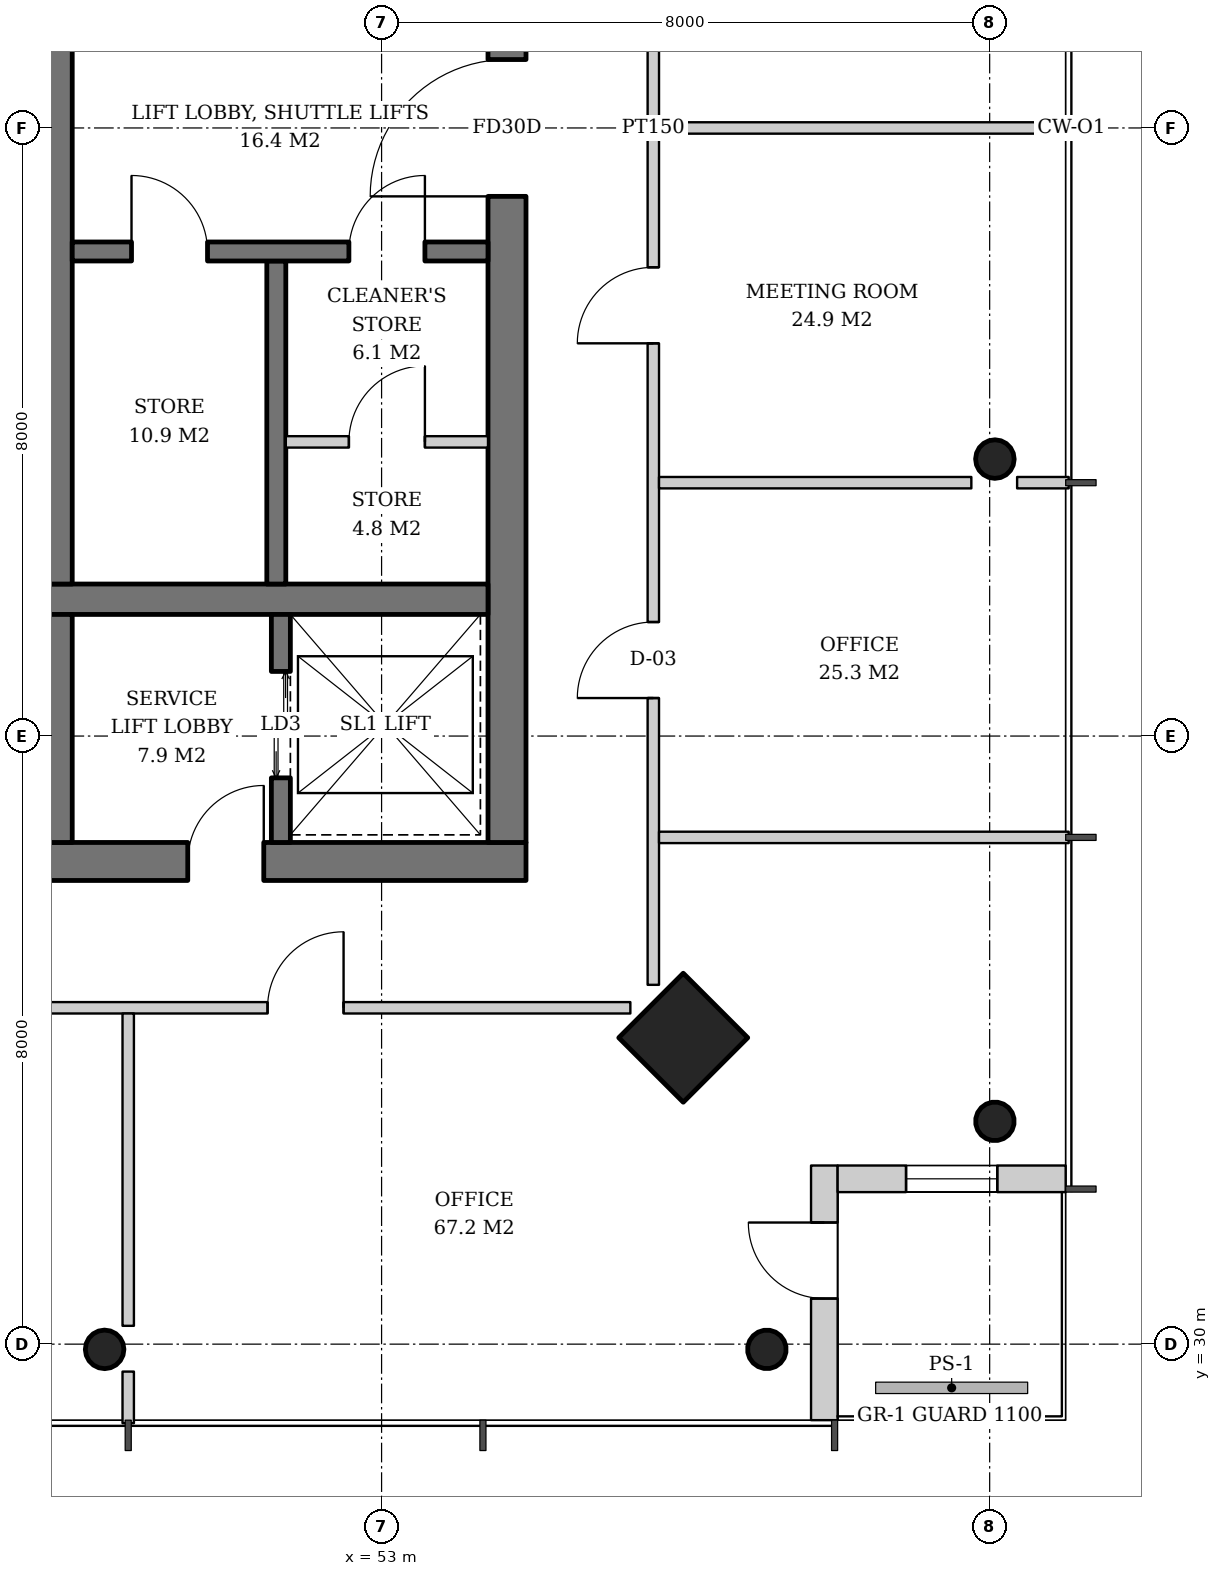
"""IFC4 building model, lengths in metres.
Left out: names, types, materials, properties, quantities, classifications, styles, units other than length and angle.
Written with IfcOpenShell. Run it as: python <this file> out.ifc"""

import sys

from ifc_helpers import new_model, si_unit, direction, frame, frame_2d, origin, origin_2d, place, context, subcontext, project, spatial, rectangle, hollow_circle, extrude, element, fill, save


model = new_model("IFC4")
c1 = context("Model", 3, precision=1e-05, world=origin(), true_north=direction((0.0, 1.0)))
c2 = subcontext(c1, "Body", "Model", "MODEL_VIEW")
j1 = project(units=[si_unit("LENGTHUNIT", "METRE"), si_unit("PLANEANGLEUNIT", "RADIAN")], contexts=[c1])
p1 = place(None, origin())
s1 = spatial("IfcSite", under=j1, at=p1, CompositionType="ELEMENT")
p2 = place(p1, origin())
s2 = spatial("IfcBuilding", under=s1, at=p2, CompositionType="ELEMENT")
p3 = place(p2, frame((0.0, 0.0, 268.0)))
s3 = spatial("IfcBuildingStorey", under=s2, at=p3, CompositionType="ELEMENT", Elevation=268.0)
p4 = place(p3, frame((61.107, 32.893, 0.0), z_axis=(-0.031962158256, 0.031962158256, 0.998977898093), x_axis=(-0.707106781187, -0.707106781187, 0.0)))
e1 = element("IfcColumn", 1, at=p4, inside=s3, PredefinedType="COLUMN", context=c2, shape_type="SweptSolid", body=[
    extrude(hollow_circle(Radius=0.254, WallThickness=0.02, at=origin_2d()), origin(), (0.0, 0.0, 1.0), 3.804),
])
p5 = place(p3, frame((61.107, 41.631, 0.0), z_axis=(-0.031976680097, 0.010658893366, 0.999431778523), x_axis=(-0.316227766017, -0.948683298051, 0.0)))
e2 = element("IfcColumn", 2, at=p5, inside=s3, PredefinedType="COLUMN", context=c2, shape_type="SweptSolid", body=[
    extrude(hollow_circle(Radius=0.254, WallThickness=0.02, at=origin_2d()), origin(), (0.0, 0.0, 1.0), 3.802),
])
p6 = place(p3, frame((57.007, 33.993, 0.0), z_axis=(-0.031898107953, 0.031898107953, 0.998981992539), x_axis=(-0.707106781187, -0.707106781187, 0.0)))
e3 = element("IfcColumn", 3, at=p6, inside=s3, PredefinedType="COLUMN", context=c2, shape_type="SweptSolid", body=[
    extrude(rectangle(XDim=1.2, YDim=1.2, at=origin_2d()), origin(), (0.0, 0.0, 1.0), 3.804),
])
p7 = place(p3, frame((58.107, 29.893, 0.0), z_axis=(-0.031962158256, 0.031962158256, 0.998977898093), x_axis=(-0.707106781187, -0.707106781187, 0.0)))
e4 = element("IfcColumn", 4, at=p7, inside=s3, PredefinedType="COLUMN", context=c2, shape_type="SweptSolid", body=[
    extrude(hollow_circle(Radius=0.254, WallThickness=0.02, at=origin_2d()), origin(), (0.0, 0.0, 1.0), 3.804),
])
p8 = place(p3, frame((49.369, 29.893, 0.0), z_axis=(-0.010658893366, 0.031976680097, 0.999431778523), x_axis=(-0.948683298051, -0.316227766017, 0.0)))
e5 = element("IfcColumn", 5, at=p8, inside=s3, PredefinedType="COLUMN", context=c2, shape_type="SweptSolid", body=[
    extrude(hollow_circle(Radius=0.254, WallThickness=0.02, at=origin_2d()), origin(), (0.0, 0.0, 1.0), 3.802),
])
p9 = place(p3, frame((35.1, 36.35, 0.0), z_axis=(0.0, 0.0, 1.0), x_axis=(1.0, 0.0, 0.0)))
e6 = element("IfcWall", 6, at=p9, inside=s3, PredefinedType="SHEAR", context=c2, shape_type="SweptSolid", body=[
    extrude(rectangle(XDim=19.8, YDim=0.5, at=frame_2d((9.9, 0.0))), origin(), (0.0, 0.0, 1.0), 3.8),
])
p10 = place(p9, frame((3.9, 0.0, 0.0)))
e7 = element("IfcOpeningElement", 7, at=p10, cuts=e6, PredefinedType="OPENING", context=c2, shape_type="SweptSolid", body=[
    extrude(rectangle(XDim=1.0, YDim=2.1, at=frame_2d((0.5, 1.05))), frame((0.0, 0.26, 0.0), z_axis=(0.0, -1.0, 0.0), x_axis=(1.0, 0.0, 0.0)), (0.0, 0.0, 1.0), 0.52),
])
p11 = place(p9, frame((15.35, 0.0, 0.0)))
e8 = element("IfcOpeningElement", 8, at=p11, cuts=e6, PredefinedType="OPENING", context=c2, shape_type="SweptSolid", body=[
    extrude(rectangle(XDim=1.0, YDim=2.1, at=frame_2d((0.5, 1.05))), frame((0.0, 0.26, 0.0), z_axis=(0.0, -1.0, 0.0), x_axis=(1.0, 0.0, 0.0)), (0.0, 0.0, 1.0), 0.52),
])
p12 = place(p3, frame((54.65, 36.6, 0.0), z_axis=(0.0, 0.0, 1.0), x_axis=(0.0, 1.0, 0.0)))
e9 = element("IfcWall", 9, at=p12, inside=s3, PredefinedType="SHEAR", context=c2, shape_type="SweptSolid", body=[
    extrude(rectangle(XDim=18.8, YDim=0.5, at=frame_2d((9.4, 0.0))), origin(), (0.0, 0.0, 1.0), 3.8),
])
p13 = place(p12, frame((8.5, 0.0, 0.0)))
e10 = element("IfcOpeningElement", 10, at=p13, cuts=e9, PredefinedType="OPENING", context=c2, shape_type="SweptSolid", body=[
    extrude(rectangle(XDim=1.8, YDim=2.4, at=frame_2d((0.9, 1.2))), frame((0.0, 0.26, 0.0), z_axis=(0.0, -1.0, 0.0), x_axis=(1.0, 0.0, 0.0)), (0.0, 0.0, 1.0), 0.52),
])
p14 = place(p3, frame((35.6, 39.8, 0.0), z_axis=(0.0, 0.0, 1.0), x_axis=(1.0, 0.0, 0.0)))
e11 = element("IfcWall", 11, at=p14, inside=s3, PredefinedType="SHEAR", context=c2, shape_type="SweptSolid", body=[
    extrude(rectangle(XDim=18.8, YDim=0.4, at=frame_2d((9.4, 0.0))), origin(), (0.0, 0.0, 1.0), 3.8),
])
p15 = place(p3, frame((48.73, 36.6, 0.0), z_axis=(0.0, 0.0, 1.0), x_axis=(0.0, 1.0, 0.0)))
e12 = element("IfcWall", 12, at=p15, inside=s3, PredefinedType="SHEAR", context=c2, shape_type="SweptSolid", body=[
    extrude(rectangle(XDim=3.0, YDim=0.4, at=frame_2d((1.5, 0.0))), origin(), (0.0, 0.0, 1.0), 3.8),
])
p16 = place(p3, frame((48.73, 40.0, 0.0), z_axis=(0.0, 0.0, 1.0), x_axis=(0.0, 1.0, 0.0)))
e13 = element("IfcWall", 13, at=p16, inside=s3, PredefinedType="SHEAR", context=c2, shape_type="SweptSolid", body=[
    extrude(rectangle(XDim=12.0, YDim=0.4, at=frame_2d((6.0, 0.0))), origin(), (0.0, 0.0, 1.0), 3.8),
])
p17 = place(p3, frame((58.825, 29.0, 0.0), z_axis=(0.0, 0.0, 1.0), x_axis=(0.0, 1.0, 0.0)))
e14 = element("IfcWall", 14, at=p17, inside=s3, PredefinedType="SOLIDWALL", context=c2, shape_type="SweptSolid", body=[
    extrude(rectangle(XDim=3.35, YDim=0.35, at=frame_2d((1.675, 0.0))), origin(), (0.0, 0.0, 1.0), 3.62),
])
p18 = place(p17, frame((1.6, 0.0, 0.0)))
e15 = element("IfcOpeningElement", 15, at=p18, cuts=e14, PredefinedType="OPENING", context=c2, shape_type="SweptSolid", body=[
    extrude(rectangle(XDim=1.0, YDim=2.4, at=frame_2d((0.5, 1.2))), frame((0.0, 0.185, 0.0), z_axis=(0.0, -1.0, 0.0), x_axis=(1.0, 0.0, 0.0)), (0.0, 0.0, 1.0), 0.37),
])
p19 = place(p3, frame((59.0, 32.175, 0.0), z_axis=(0.0, 0.0, 1.0), x_axis=(1.0, 0.0, 0.0)))
e16 = element("IfcWall", 16, at=p19, inside=s3, PredefinedType="SOLIDWALL", context=c2, shape_type="SweptSolid", body=[
    extrude(rectangle(XDim=3.0, YDim=0.35, at=frame_2d((1.5, 0.0))), origin(), (0.0, 0.0, 1.0), 3.62),
])
p20 = place(p19, frame((0.9, 0.0, 0.6)))
e17 = element("IfcOpeningElement", 17, at=p20, cuts=e16, PredefinedType="OPENING", context=c2, shape_type="SweptSolid", body=[
    extrude(rectangle(XDim=1.2, YDim=2.55, at=frame_2d((0.6, 1.275))), frame((0.0, 0.185, 0.0), z_axis=(0.0, -1.0, 0.0), x_axis=(1.0, 0.0, 0.0)), (0.0, 0.0, 1.0), 0.37),
])
p21 = place(p3, frame((51.675, 36.6, 0.0), z_axis=(0.0, 0.0, 1.0), x_axis=(0.0, 1.0, 0.0)))
e18 = element("IfcWall", 18, at=p21, inside=s3, PredefinedType="SHEAR", context=c2, shape_type="SweptSolid", body=[
    extrude(rectangle(XDim=3.0, YDim=0.25, at=frame_2d((1.5, 0.0))), origin(), (0.0, 0.0, 1.0), 3.8),
])
p22 = place(p21, frame((0.85, 0.0, 0.0)))
e19 = element("IfcOpeningElement", 19, at=p22, cuts=e18, PredefinedType="OPENING", context=c2, shape_type="SweptSolid", body=[
    extrude(rectangle(XDim=1.4, YDim=2.4, at=frame_2d((0.7, 1.2))), frame((0.0, 0.135, 0.0), z_axis=(0.0, -1.0, 0.0), x_axis=(1.0, 0.0, 0.0)), (0.0, 0.0, 1.0), 0.27),
])
p23 = place(p3, frame((51.615, 44.25, 0.0), z_axis=(0.0, 0.0, 1.0), x_axis=(0.0, -1.0, 0.0)))
e20 = element("IfcWall", 20, at=p23, inside=s3, PredefinedType="SHEAR", context=c2, shape_type="SweptSolid", body=[
    extrude(rectangle(XDim=4.25, YDim=0.25, at=frame_2d((2.125, 0.0))), origin(), (0.0, 0.0, 1.0), 3.8),
])
p24 = place(p3, frame((48.93, 44.375, 0.0), z_axis=(0.0, 0.0, 1.0), x_axis=(1.0, 0.0, 0.0)))
e21 = element("IfcWall", 21, at=p24, inside=s3, PredefinedType="SHEAR", context=c2, shape_type="SweptSolid", body=[
    extrude(rectangle(XDim=5.47, YDim=0.25, at=frame_2d((2.735, 0.0))), origin(), (0.0, 0.0, 1.0), 3.8),
])
p25 = place(p24, frame((0.78, 0.0, 0.0)))
e22 = element("IfcOpeningElement", 22, at=p25, cuts=e21, PredefinedType="OPENING", context=c2, shape_type="SweptSolid", body=[
    extrude(rectangle(XDim=1.0, YDim=2.1, at=frame_2d((0.5, 1.05))), frame((0.0, 0.135, 0.0), z_axis=(0.0, -1.0, 0.0), x_axis=(1.0, 0.0, 0.0)), (0.0, 0.0, 1.0), 0.27),
])
p26 = place(p24, frame((3.64, 0.0, 0.0)))
e23 = element("IfcOpeningElement", 23, at=p26, cuts=e21, PredefinedType="OPENING", context=c2, shape_type="SweptSolid", body=[
    extrude(rectangle(XDim=1.0, YDim=2.1, at=frame_2d((0.5, 1.05))), frame((0.0, 0.135, 0.0), z_axis=(0.0, -1.0, 0.0), x_axis=(1.0, 0.0, 0.0)), (0.0, 0.0, 1.0), 0.27),
])
p27 = place(p3, frame((51.74, 41.87, 0.0), z_axis=(0.0, 0.0, 1.0), x_axis=(1.0, 0.0, 0.0)))
e24 = element("IfcWall", 24, at=p27, inside=s3, PredefinedType="SOLIDWALL", context=c2, shape_type="SweptSolid", body=[
    extrude(rectangle(XDim=2.66, YDim=0.15, at=frame_2d((1.33, 0.0))), origin(), (0.0, 0.0, 1.0), 3.62),
])
p28 = place(p27, frame((0.83, 0.0, 0.0)))
e25 = element("IfcOpeningElement", 25, at=p28, cuts=e24, PredefinedType="OPENING", context=c2, shape_type="SweptSolid", body=[
    extrude(rectangle(XDim=1.0, YDim=2.1, at=frame_2d((0.5, 1.05))), frame((0.0, 0.085, 0.0), z_axis=(0.0, -1.0, 0.0), x_axis=(1.0, 0.0, 0.0)), (0.0, 0.0, 1.0), 0.17),
])
p29 = place(p3, frame((56.575, 34.727, 0.0), z_axis=(0.0, 0.0, 1.0), x_axis=(0.0, 1.0, 0.0)))
e26 = element("IfcWall", 26, at=p29, inside=s3, PredefinedType="PARTITIONING", context=c2, shape_type="SweptSolid", body=[
    extrude(rectangle(XDim=22.546, YDim=0.15, at=frame_2d((11.273, 0.0))), origin(), (0.0, 0.0, 1.0), 3.02),
])
p30 = place(p29, frame((3.773, 0.0, 0.0)))
e27 = element("IfcOpeningElement", 27, at=p30, cuts=e26, PredefinedType="OPENING", context=c2, shape_type="SweptSolid", body=[
    extrude(rectangle(XDim=1.0, YDim=2.1, at=frame_2d((0.5, 1.05))), frame((0.0, 0.085, 0.0), z_axis=(0.0, -1.0, 0.0), x_axis=(1.0, 0.0, 0.0)), (0.0, 0.0, 1.0), 0.17),
])
p31 = place(p29, frame((8.439, 0.0, 0.0)))
e28 = element("IfcOpeningElement", 28, at=p31, cuts=e26, PredefinedType="OPENING", context=c2, shape_type="SweptSolid", body=[
    extrude(rectangle(XDim=1.0, YDim=2.1, at=frame_2d((0.5, 1.05))), frame((0.0, 0.085, 0.0), z_axis=(0.0, -1.0, 0.0), x_axis=(1.0, 0.0, 0.0)), (0.0, 0.0, 1.0), 0.17),
])
p32 = place(p29, frame((13.106, 0.0, 0.0)))
e29 = element("IfcOpeningElement", 29, at=p32, cuts=e26, PredefinedType="OPENING", context=c2, shape_type="SweptSolid", body=[
    extrude(rectangle(XDim=1.0, YDim=2.1, at=frame_2d((0.5, 1.05))), frame((0.0, 0.085, 0.0), z_axis=(0.0, -1.0, 0.0), x_axis=(1.0, 0.0, 0.0)), (0.0, 0.0, 1.0), 0.17),
])
p33 = place(p29, frame((17.773, 0.0, 0.0)))
e30 = element("IfcOpeningElement", 30, at=p33, cuts=e26, PredefinedType="OPENING", context=c2, shape_type="SweptSolid", body=[
    extrude(rectangle(XDim=1.0, YDim=2.1, at=frame_2d((0.5, 1.05))), frame((0.0, 0.085, 0.0), z_axis=(0.0, -1.0, 0.0), x_axis=(1.0, 0.0, 0.0)), (0.0, 0.0, 1.0), 0.17),
])
p34 = place(p3, frame((56.65, 36.667, 0.0), z_axis=(0.0, 0.0, 1.0), x_axis=(1.0, 0.0, 0.0)))
e31 = element("IfcWall", 31, at=p34, inside=s3, PredefinedType="PARTITIONING", context=c2, shape_type="SweptSolid", body=[
    extrude(rectangle(XDim=5.39, YDim=0.15, at=frame_2d((2.695, 0.0))), origin(), (0.0, 0.0, 1.0), 3.12),
])
p35 = place(p3, frame((56.65, 41.333, 0.0), z_axis=(0.0, 0.0, 1.0), x_axis=(1.0, 0.0, 0.0)))
e32 = element("IfcWall", 32, at=p35, inside=s3, PredefinedType="PARTITIONING", context=c2, shape_type="SweptSolid", body=[
    extrude(rectangle(XDim=4.109, YDim=0.15, at=frame_2d((2.055, 0.0))), origin(), (0.0, 0.0, 1.0), 3.62),
])
p36 = place(p3, frame((61.361, 41.333, 0.0), z_axis=(0.0, 0.0, 1.0), x_axis=(1.0, 0.0, 0.0)))
e33 = element("IfcWall", 33, at=p36, inside=s3, PredefinedType="PARTITIONING", context=c2, shape_type="SweptSolid", body=[
    extrude(rectangle(XDim=0.679, YDim=0.15, at=frame_2d((0.339, 0.0))), origin(), (0.0, 0.0, 1.0), 3.62),
])
p37 = place(p3, frame((56.65, 46.0, 0.0), z_axis=(0.0, 0.0, 1.0), x_axis=(1.0, 0.0, 0.0)))
e34 = element("IfcWall", 34, at=p37, inside=s3, PredefinedType="PARTITIONING", context=c2, shape_type="SweptSolid", body=[
    extrude(rectangle(XDim=5.39, YDim=0.15, at=frame_2d((2.695, 0.0))), origin(), (0.0, 0.0, 1.0), 3.12),
])
p38 = place(p3, frame((33.727, 34.425, 0.0), z_axis=(0.0, 0.0, 1.0), x_axis=(1.0, 0.0, 0.0)))
e35 = element("IfcWall", 35, at=p38, inside=s3, PredefinedType="PARTITIONING", context=c2, shape_type="SweptSolid", body=[
    extrude(rectangle(XDim=22.546, YDim=0.15, at=frame_2d((11.273, 0.0))), origin(), (0.0, 0.0, 1.0), 3.02),
])
p39 = place(p38, frame((3.773, 0.0, 0.0)))
e36 = element("IfcOpeningElement", 36, at=p39, cuts=e35, PredefinedType="OPENING", context=c2, shape_type="SweptSolid", body=[
    extrude(rectangle(XDim=1.0, YDim=2.1, at=frame_2d((0.5, 1.05))), frame((0.0, 0.085, 0.0), z_axis=(0.0, -1.0, 0.0), x_axis=(1.0, 0.0, 0.0)), (0.0, 0.0, 1.0), 0.17),
])
p40 = place(p38, frame((8.439, 0.0, 0.0)))
e37 = element("IfcOpeningElement", 37, at=p40, cuts=e35, PredefinedType="OPENING", context=c2, shape_type="SweptSolid", body=[
    extrude(rectangle(XDim=1.0, YDim=2.1, at=frame_2d((0.5, 1.05))), frame((0.0, 0.085, 0.0), z_axis=(0.0, -1.0, 0.0), x_axis=(1.0, 0.0, 0.0)), (0.0, 0.0, 1.0), 0.17),
])
p41 = place(p38, frame((13.106, 0.0, 0.0)))
e38 = element("IfcOpeningElement", 38, at=p41, cuts=e35, PredefinedType="OPENING", context=c2, shape_type="SweptSolid", body=[
    extrude(rectangle(XDim=1.0, YDim=2.1, at=frame_2d((0.5, 1.05))), frame((0.0, 0.085, 0.0), z_axis=(0.0, -1.0, 0.0), x_axis=(1.0, 0.0, 0.0)), (0.0, 0.0, 1.0), 0.17),
])
p42 = place(p38, frame((17.773, 0.0, 0.0)))
e39 = element("IfcOpeningElement", 39, at=p42, cuts=e35, PredefinedType="OPENING", context=c2, shape_type="SweptSolid", body=[
    extrude(rectangle(XDim=1.0, YDim=2.1, at=frame_2d((0.5, 1.05))), frame((0.0, 0.085, 0.0), z_axis=(0.0, -1.0, 0.0), x_axis=(1.0, 0.0, 0.0)), (0.0, 0.0, 1.0), 0.17),
])
p43 = place(p3, frame((49.667, 34.35, 0.0), z_axis=(0.0, 0.0, 1.0), x_axis=(0.0, -1.0, 0.0)))
e40 = element("IfcWall", 40, at=p43, inside=s3, PredefinedType="PARTITIONING", context=c2, shape_type="SweptSolid", body=[
    extrude(rectangle(XDim=4.109, YDim=0.15, at=frame_2d((2.055, 0.0))), origin(), (0.0, 0.0, 1.0), 3.62),
])
p44 = place(p3, frame((49.667, 29.639, 0.0), z_axis=(0.0, 0.0, 1.0), x_axis=(0.0, -1.0, 0.0)))
e41 = element("IfcWall", 41, at=p44, inside=s3, PredefinedType="PARTITIONING", context=c2, shape_type="SweptSolid", body=[
    extrude(rectangle(XDim=0.679, YDim=0.15, at=frame_2d((0.339, 0.0))), origin(), (0.0, 0.0, 1.0), 3.62),
])
p45 = place(p18, origin())
e42 = element("IfcDoor", 42, at=p45, inside=s3, OperationType="SINGLE_SWING_RIGHT", PredefinedType="DOOR", context=c2, shape_type="SweptSolid", body=[
    extrude(rectangle(XDim=1.0, YDim=2.4, at=frame_2d((0.5, 1.2))), frame((0.0, 0.025, 0.0), z_axis=(0.0, -1.0, 0.0), x_axis=(1.0, 0.0, 0.0)), (0.0, 0.0, 1.0), 0.05),
])
fill(e15, e42)
p46 = place(p20, origin())
e43 = element("IfcWindow", 43, at=p46, inside=s3, PartitioningType="SINGLE_PANEL", PredefinedType="WINDOW", context=c2, shape_type="SweptSolid", body=[
    extrude(rectangle(XDim=1.2, YDim=2.55, at=frame_2d((0.6, 1.275))), frame((0.0, 0.03, 0.0), z_axis=(0.0, -1.0, 0.0), x_axis=(1.0, 0.0, 0.0)), (0.0, 0.0, 1.0), 0.06),
])
fill(e17, e43)
p47 = place(p22, origin())
e44 = element("IfcDoor", 44, at=p47, inside=s3, OperationType="DOUBLE_DOOR_SLIDING", PredefinedType="DOOR", context=c2, shape_type="SweptSolid", body=[
    extrude(rectangle(XDim=1.4, YDim=2.4, at=frame_2d((0.7, 1.2))), frame((0.0, 0.025, 0.0), z_axis=(0.0, -1.0, 0.0), x_axis=(1.0, 0.0, 0.0)), (0.0, 0.0, 1.0), 0.05),
])
fill(e19, e44)
p48 = place(p25, origin())
e45 = element("IfcDoor", 45, at=p48, inside=s3, OperationType="SINGLE_SWING_LEFT", PredefinedType="DOOR", context=c2, shape_type="SweptSolid", body=[
    extrude(rectangle(XDim=1.0, YDim=2.1, at=frame_2d((0.5, 1.05))), frame((0.0, 0.025, 0.0), z_axis=(0.0, -1.0, 0.0), x_axis=(1.0, 0.0, 0.0)), (0.0, 0.0, 1.0), 0.05),
])
fill(e22, e45)
p49 = place(p26, origin())
e46 = element("IfcDoor", 46, at=p49, inside=s3, OperationType="SINGLE_SWING_RIGHT", PredefinedType="DOOR", context=c2, shape_type="SweptSolid", body=[
    extrude(rectangle(XDim=1.0, YDim=2.1, at=frame_2d((0.5, 1.05))), frame((0.0, 0.025, 0.0), z_axis=(0.0, -1.0, 0.0), x_axis=(1.0, 0.0, 0.0)), (0.0, 0.0, 1.0), 0.05),
])
fill(e23, e46)
p50 = place(p28, origin())
e47 = element("IfcDoor", 47, at=p50, inside=s3, OperationType="SINGLE_SWING_RIGHT", PredefinedType="DOOR", context=c2, shape_type="SweptSolid", body=[
    extrude(rectangle(XDim=1.0, YDim=2.1, at=frame_2d((0.5, 1.05))), frame((0.0, 0.025, 0.0), z_axis=(0.0, -1.0, 0.0), x_axis=(1.0, 0.0, 0.0)), (0.0, 0.0, 1.0), 0.05),
])
fill(e25, e47)
p51 = place(p13, origin())
e48 = element("IfcDoor", 48, at=p51, inside=s3, OperationType="DOUBLE_DOOR_SINGLE_SWING", PredefinedType="DOOR", context=c2, shape_type="SweptSolid", body=[
    extrude(rectangle(XDim=1.8, YDim=2.4, at=frame_2d((0.9, 1.2))), frame((0.0, 0.025, 0.0), z_axis=(0.0, -1.0, 0.0), x_axis=(1.0, 0.0, 0.0)), (0.0, 0.0, 1.0), 0.05),
])
fill(e10, e48)
p52 = place(p11, origin())
e49 = element("IfcDoor", 49, at=p52, inside=s3, OperationType="SINGLE_SWING_RIGHT", PredefinedType="DOOR", context=c2, shape_type="SweptSolid", body=[
    extrude(rectangle(XDim=1.0, YDim=2.1, at=frame_2d((0.5, 1.05))), frame((0.0, 0.025, 0.0), z_axis=(0.0, -1.0, 0.0), x_axis=(1.0, 0.0, 0.0)), (0.0, 0.0, 1.0), 0.05),
])
fill(e8, e49)
p53 = place(p30, origin())
e50 = element("IfcDoor", 50, at=p53, inside=s3, OperationType="SINGLE_SWING_LEFT", PredefinedType="DOOR", context=c2, shape_type="SweptSolid", body=[
    extrude(rectangle(XDim=1.0, YDim=2.1, at=frame_2d((0.5, 1.05))), frame((0.0, 0.025, 0.0), z_axis=(0.0, -1.0, 0.0), x_axis=(1.0, 0.0, 0.0)), (0.0, 0.0, 1.0), 0.05),
])
fill(e27, e50)
p54 = place(p31, origin())
e51 = element("IfcDoor", 51, at=p54, inside=s3, OperationType="SINGLE_SWING_LEFT", PredefinedType="DOOR", context=c2, shape_type="SweptSolid", body=[
    extrude(rectangle(XDim=1.0, YDim=2.1, at=frame_2d((0.5, 1.05))), frame((0.0, 0.025, 0.0), z_axis=(0.0, -1.0, 0.0), x_axis=(1.0, 0.0, 0.0)), (0.0, 0.0, 1.0), 0.05),
])
fill(e28, e51)
p55 = place(p42, origin())
e52 = element("IfcDoor", 52, at=p55, inside=s3, OperationType="SINGLE_SWING_RIGHT", PredefinedType="DOOR", context=c2, shape_type="SweptSolid", body=[
    extrude(rectangle(XDim=1.0, YDim=2.1, at=frame_2d((0.5, 1.05))), frame((0.0, 0.025, 0.0), z_axis=(0.0, -1.0, 0.0), x_axis=(1.0, 0.0, 0.0)), (0.0, 0.0, 1.0), 0.05),
])
fill(e39, e52)
save(model, sys.argv[1])
